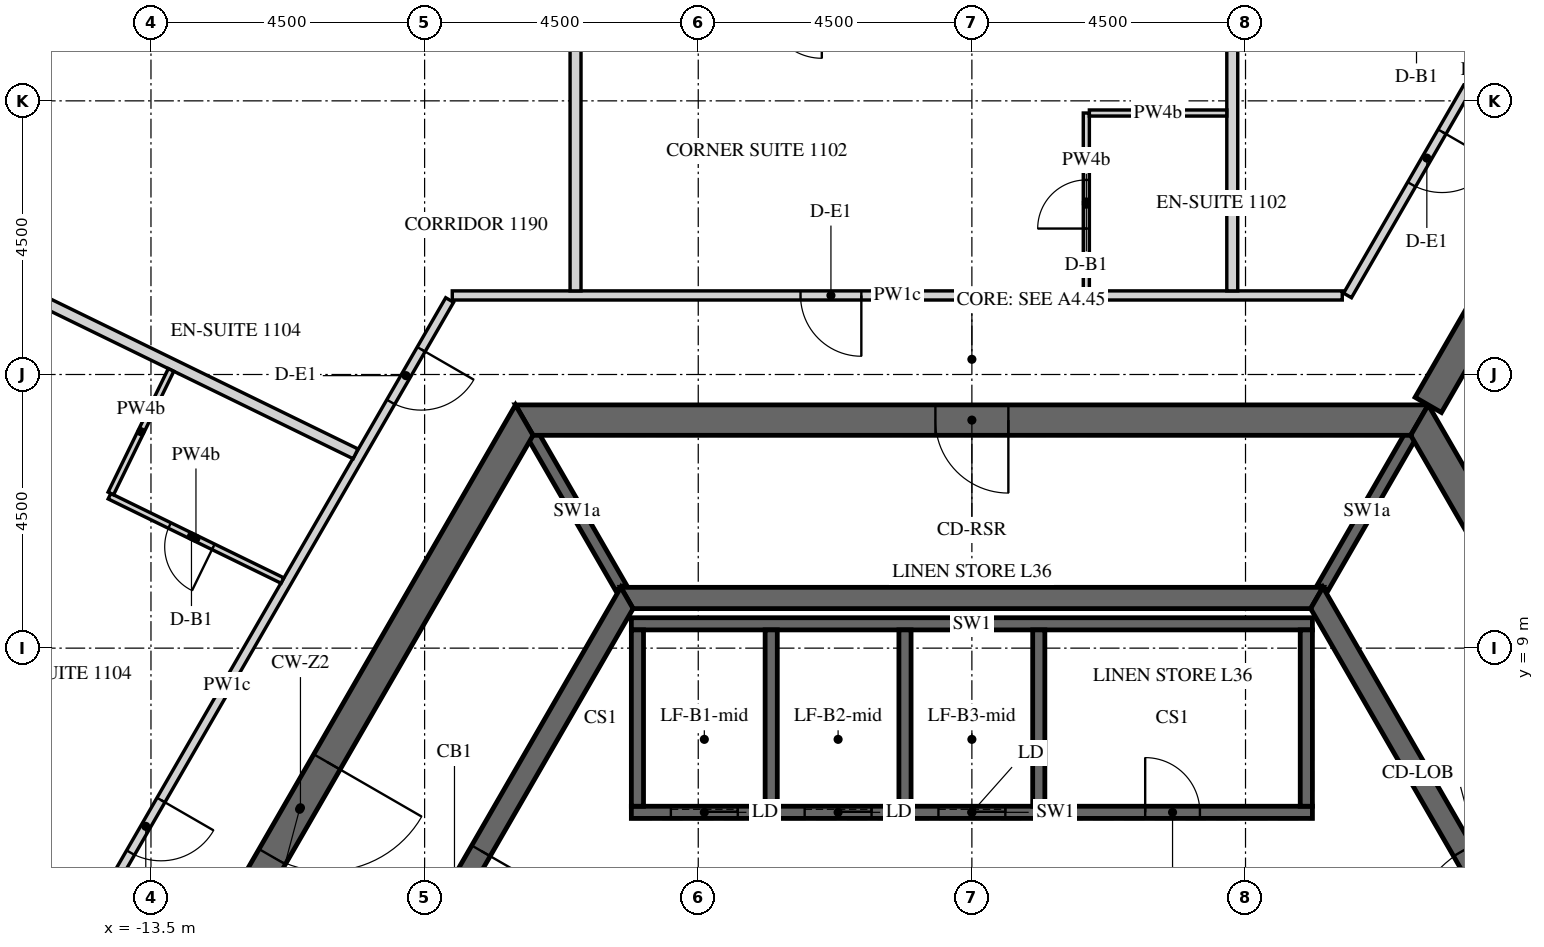
"""IFC4 building model, lengths in metres.
Left out: names, types, materials, properties, quantities, classifications, styles, units other than length and angle.
Written with IfcOpenShell. Run it as: python <this file> out.ifc"""

import sys

from ifc_helpers import new_model, si_unit, direction, frame, frame_2d, origin, place, context, subcontext, project, spatial, polyline, rectangle, outline, extrude, element, fill, save


model = new_model("IFC4")
c1 = context("Model", 3, precision=1e-05, world=origin(), true_north=direction((0.0, 1.0)))
c2 = subcontext(c1, "Body", "Model", "MODEL_VIEW")
j1 = project(units=[si_unit("LENGTHUNIT", "METRE"), si_unit("PLANEANGLEUNIT", "RADIAN")], contexts=[c1])
p1 = place(None, origin())
s1 = spatial("IfcSite", under=j1, at=p1, CompositionType="ELEMENT")
p2 = place(p1, origin())
s2 = spatial("IfcBuilding", under=s1, at=p2, CompositionType="ELEMENT")
p3 = place(p2, frame((0.0, 0.0, 156.6)))
s3 = spatial("IfcBuildingStorey", under=s2, at=p3, CompositionType="ELEMENT", Elevation=156.6)
p4 = place(p3, frame((-7.361, 12.75, -0.15), z_axis=(0.0, 0.0, 1.0), x_axis=(-0.50000571537, -0.866022103989, 0.0)))
e1 = element("IfcWall", 1, at=p4, inside=s3, PredefinedType="SHEAR", context=c2, shape_type="SweptSolid", body=[
    extrude(outline(polyline([(-0.144, -0.25), (14.867, -0.25), (14.578, 0.25), (0.144, 0.25), (-0.144, -0.25)])), origin(), (0.0, 0.0, 1.0), 3.9),
])
p5 = place(p4, frame((6.49, 0.0, 0.15)))
e2 = element("IfcOpeningElement", 2, at=p5, cuts=e1, PredefinedType="OPENING", context=c2, shape_type="SweptSolid", body=[
    extrude(rectangle(XDim=1.8, YDim=2.4, at=frame_2d((0.9, 1.2))), frame((0.0, 0.26, 0.0), z_axis=(0.0, -1.0, 0.0), x_axis=(1.0, 0.0, 0.0)), (0.0, 0.0, 1.0), 0.52),
])
p6 = place(p3, frame((14.722, 0.0, -0.15), z_axis=(0.0, 0.0, 1.0), x_axis=(-0.50000571537, 0.866022103989, 0.0)))
e3 = element("IfcWall", 3, at=p6, inside=s3, PredefinedType="SHEAR", context=c2, shape_type="SweptSolid", body=[
    extrude(outline(polyline([(-0.144, -0.25), (14.867, -0.25), (14.578, 0.25), (0.144, 0.25), (-0.144, -0.25)])), origin(), (0.0, 0.0, 1.0), 3.9),
])
p7 = place(p6, frame((6.432, 0.0, 0.15)))
e4 = element("IfcOpeningElement", 4, at=p7, cuts=e3, PredefinedType="OPENING", context=c2, shape_type="SweptSolid", body=[
    extrude(rectangle(XDim=1.8, YDim=2.4, at=frame_2d((0.9, 1.2))), frame((0.0, 0.26, 0.0), z_axis=(0.0, -1.0, 0.0), x_axis=(1.0, 0.0, 0.0)), (0.0, 0.0, 1.0), 0.52),
])
p8 = place(p3, frame((7.361, 12.75, -0.15), z_axis=(0.0, 0.0, 1.0), x_axis=(-1.0, 0.0, 0.0)))
e5 = element("IfcWall", 5, at=p8, inside=s3, PredefinedType="SHEAR", context=c2, shape_type="SweptSolid", body=[
    extrude(outline(polyline([(-0.144, -0.25), (14.866, -0.25), (14.578, 0.25), (0.144, 0.25), (-0.144, -0.25)])), origin(), (0.0, 0.0, 1.0), 3.9),
])
p9 = place(p8, frame((6.761, 0.0, 0.15)))
e6 = element("IfcOpeningElement", 6, at=p9, cuts=e5, PredefinedType="OPENING", context=c2, shape_type="SweptSolid", body=[
    extrude(rectangle(XDim=1.2, YDim=2.4, at=frame_2d((0.6, 1.2))), frame((0.0, 0.26, 0.0), z_axis=(0.0, -1.0, 0.0), x_axis=(1.0, 0.0, 0.0)), (0.0, 0.0, 1.0), 0.52),
])
p10 = place(p3, frame((7.506, 13.0, -0.15), z_axis=(0.0, 0.0, 1.0), x_axis=(0.499988271576, 0.866032175087, 0.0)))
e7 = element("IfcWall", 7, at=p10, inside=s3, PredefinedType="SHEAR", context=c2, shape_type="SweptSolid", body=[
    extrude(rectangle(XDim=15.424, YDim=0.5, at=frame_2d((7.712, 0.0))), origin(), (0.0, 0.0, 1.0), 3.9),
])
p11 = place(p10, frame((6.812, 0.0, 0.15)))
e8 = element("IfcOpeningElement", 8, at=p11, cuts=e7, PredefinedType="OPENING", context=c2, shape_type="SweptSolid", body=[
    extrude(rectangle(XDim=1.8, YDim=2.4, at=frame_2d((0.9, 1.2))), frame((0.0, 0.26, 0.0), z_axis=(0.0, -1.0, 0.0), x_axis=(1.0, 0.0, 0.0)), (0.0, 0.0, 1.0), 0.52),
])
p12 = place(p3, frame((-5.673, 9.825, -0.15), z_axis=(0.0, 0.0, 1.0), x_axis=(-0.499995046907, -0.866028263435, 0.0)))
e9 = element("IfcWall", 9, at=p12, inside=s3, PredefinedType="SHEAR", context=c2, shape_type="SweptSolid", body=[
    extrude(outline(polyline([(-0.101, -0.175), (11.446, -0.175), (11.244, 0.175), (0.101, 0.175), (-0.101, -0.175)])), origin(), (0.0, 0.0, 1.0), 3.9),
])
p13 = place(p12, frame((4.801, 0.0, 0.15)))
e10 = element("IfcOpeningElement", 10, at=p13, cuts=e9, PredefinedType="OPENING", context=c2, shape_type="SweptSolid", body=[
    extrude(rectangle(XDim=1.8, YDim=2.4, at=frame_2d((0.9, 1.2))), frame((0.0, 0.185, 0.0), z_axis=(0.0, -1.0, 0.0), x_axis=(1.0, 0.0, 0.0)), (0.0, 0.0, 1.0), 0.37),
])
p14 = place(p3, frame((11.345, 0.0, -0.15), z_axis=(0.0, 0.0, 1.0), x_axis=(-0.499995046907, 0.866028263435, 0.0)))
e11 = element("IfcWall", 11, at=p14, inside=s3, PredefinedType="SHEAR", context=c2, shape_type="SweptSolid", body=[
    extrude(outline(polyline([(-0.101, -0.175), (11.446, -0.175), (11.244, 0.175), (0.101, 0.175), (-0.101, -0.175)])), origin(), (0.0, 0.0, 1.0), 3.9),
])
p15 = place(p14, frame((4.744, 0.0, 0.15)))
e12 = element("IfcOpeningElement", 12, at=p15, cuts=e11, PredefinedType="OPENING", context=c2, shape_type="SweptSolid", body=[
    extrude(rectangle(XDim=1.8, YDim=2.4, at=frame_2d((0.9, 1.2))), frame((0.0, 0.185, 0.0), z_axis=(0.0, -1.0, 0.0), x_axis=(1.0, 0.0, 0.0)), (0.0, 0.0, 1.0), 0.37),
])
p16 = place(p3, frame((5.673, 9.825, -0.15), z_axis=(0.0, 0.0, 1.0), x_axis=(-1.0, 0.0, 0.0)))
e13 = element("IfcWall", 13, at=p16, inside=s3, PredefinedType="SHEAR", context=c2, shape_type="SweptSolid", body=[
    extrude(outline(polyline([(-0.101, -0.175), (11.446, -0.175), (11.244, 0.175), (0.101, 0.175), (-0.101, -0.175)])), origin(), (0.0, 0.0, 1.0), 3.9),
])
p17 = place(p3, frame((-5.6, 6.3, -0.25), z_axis=(0.0, 0.0, 1.0), x_axis=(1.0, 0.0, 0.0)))
e14 = element("IfcWall", 14, at=p17, inside=s3, PredefinedType="SHEAR", context=c2, shape_type="SweptSolid", body=[
    extrude(rectangle(XDim=11.2, YDim=0.2, at=frame_2d((5.6, 0.0))), origin(), (0.0, 0.0, 1.0), 3.9),
])
p18 = place(p17, frame((8.45, 0.0, 0.25)))
e15 = element("IfcOpeningElement", 15, at=p18, cuts=e14, PredefinedType="OPENING", context=c2, shape_type="SweptSolid", body=[
    extrude(rectangle(XDim=0.9, YDim=2.1, at=frame_2d((0.45, 1.05))), frame((0.0, 0.11, 0.0), z_axis=(0.0, -1.0, 0.0), x_axis=(1.0, 0.0, 0.0)), (0.0, 0.0, 1.0), 0.22),
])
p19 = place(p17, frame((0.65, 0.0, 0.25)))
e16 = element("IfcOpeningElement", 16, at=p19, cuts=e14, PredefinedType="OPENING", context=c2, shape_type="SweptSolid", body=[
    extrude(rectangle(XDim=1.1, YDim=2.1, at=frame_2d((0.55, 1.05))), frame((0.0, 0.11, 0.0), z_axis=(0.0, -1.0, 0.0), x_axis=(1.0, 0.0, 0.0)), (0.0, 0.0, 1.0), 0.22),
])
p20 = place(p17, frame((2.85, 0.0, 0.25)))
e17 = element("IfcOpeningElement", 17, at=p20, cuts=e14, PredefinedType="OPENING", context=c2, shape_type="SweptSolid", body=[
    extrude(rectangle(XDim=1.1, YDim=2.1, at=frame_2d((0.55, 1.05))), frame((0.0, 0.11, 0.0), z_axis=(0.0, -1.0, 0.0), x_axis=(1.0, 0.0, 0.0)), (0.0, 0.0, 1.0), 0.22),
])
p21 = place(p17, frame((5.05, 0.0, 0.25)))
e18 = element("IfcOpeningElement", 18, at=p21, cuts=e14, PredefinedType="OPENING", context=c2, shape_type="SweptSolid", body=[
    extrude(rectangle(XDim=1.1, YDim=2.1, at=frame_2d((0.55, 1.05))), frame((0.0, 0.11, 0.0), z_axis=(0.0, -1.0, 0.0), x_axis=(1.0, 0.0, 0.0)), (0.0, 0.0, 1.0), 0.22),
])
p22 = place(p3, frame((-5.6, 9.4, -0.25), z_axis=(0.0, 0.0, 1.0), x_axis=(1.0, 0.0, 0.0)))
e19 = element("IfcWall", 19, at=p22, inside=s3, PredefinedType="SHEAR", context=c2, shape_type="SweptSolid", body=[
    extrude(rectangle(XDim=11.2, YDim=0.2, at=frame_2d((5.6, 0.0))), origin(), (0.0, 0.0, 1.0), 3.9),
])
for number, where, z_axis, x_axis in (
    (20, (-5.5, 6.4, -0.25), (0.0, 0.0, 1.0), (0.0, 1.0, 0.0)),
    (21, (-3.3, 6.4, -0.25), (0.0, 0.0, 1.0), (0.0, 1.0, 0.0)),
    (22, (-1.1, 6.4, -0.25), (0.0, 0.0, 1.0), (0.0, 1.0, 0.0)),
    (23, (1.1, 6.4, -0.25), (0.0, 0.0, 1.0), (0.0, 1.0, 0.0)),
    (24, (5.5, 6.4, -0.25), (0.0, 0.0, 1.0), (0.0, 1.0, 0.0)),
):
    element("IfcWall", number, at=place(p3, frame(where, z_axis=z_axis, x_axis=x_axis)), inside=s3, PredefinedType="SHEAR", context=c2, shape_type="SweptSolid", body=[
        extrude(rectangle(XDim=2.9, YDim=0.2, at=frame_2d((1.45, 0.0))), origin(), (0.0, 0.0, 1.0), 3.9),
    ])
for number, where, z_axis, x_axis in (
    (25, (5.773, 10.0, -0.15), (0.0, 0.0, 1.0), (0.5, 0.866, 0.0)),
    (26, (-5.773, 10.0, -0.15), (0.0, 0.0, 1.0), (-0.5, 0.866, 0.0)),
):
    element("IfcWall", number, at=place(p3, frame(where, z_axis=z_axis, x_axis=x_axis)), inside=s3, PredefinedType="SHEAR", context=c2, shape_type="SweptSolid", body=[
        extrude(rectangle(XDim=2.887, YDim=0.2, at=frame_2d((1.443, 0.0))), origin(), (0.0, 0.0, 1.0), 3.9),
    ])
p23 = place(p3, frame((10.149, 21.678, 0.0), z_axis=(0.0, 0.0, 1.0), x_axis=(-0.499997422768, -0.866026891745, 0.0)))
e27 = element("IfcWall", 27, at=p23, inside=s3, PredefinedType="PARTITIONING", context=c2, shape_type="SweptSolid", body=[
    extrude(rectangle(XDim=7.942, YDim=0.15, at=frame_2d((3.971, 0.0))), origin(), (0.0, 0.0, 1.0), 2.823),
])
p24 = place(p23, frame((4.833, 0.0, 0.0)))
e28 = element("IfcOpeningElement", 28, at=p24, cuts=e27, PredefinedType="OPENING", context=c2, shape_type="SweptSolid", body=[
    extrude(rectangle(XDim=1.0, YDim=2.1, at=frame_2d((0.5, 1.05))), frame((0.0, 0.085, 0.0), z_axis=(0.0, -1.0, 0.0), x_axis=(1.0, 0.0, 0.0)), (0.0, 0.0, 1.0), 0.17),
])
p25 = place(p3, frame((6.091, 14.8, 0.0), z_axis=(0.0, 0.0, 1.0), x_axis=(-1.0, 0.0, 0.0)))
e29 = element("IfcWall", 29, at=p25, inside=s3, PredefinedType="PARTITIONING", context=c2, shape_type="SweptSolid", body=[
    extrude(rectangle(XDim=14.636, YDim=0.15, at=frame_2d((7.318, 0.0))), origin(), (0.0, 0.0, 1.0), 2.823),
])
p26 = place(p25, frame((7.909, 0.0, 0.0)))
e30 = element("IfcOpeningElement", 30, at=p26, cuts=e29, PredefinedType="OPENING", context=c2, shape_type="SweptSolid", body=[
    extrude(rectangle(XDim=1.0, YDim=2.1, at=frame_2d((0.5, 1.05))), frame((0.0, 0.085, 0.0), z_axis=(0.0, -1.0, 0.0), x_axis=(1.0, 0.0, 0.0)), (0.0, 0.0, 1.0), 0.17),
])
p27 = place(p3, frame((-8.588, 14.725, 0.0), z_axis=(0.0, 0.0, 1.0), x_axis=(-0.499996322767, -0.866027526826, 0.0)))
e31 = element("IfcWall", 31, at=p27, inside=s3, PredefinedType="PARTITIONING", context=c2, shape_type="SweptSolid", body=[
    extrude(rectangle(XDim=14.636, YDim=0.15, at=frame_2d((7.318, 0.0))), origin(), (0.0, 0.0, 1.0), 2.823),
])
p28 = place(p27, frame((0.936, 0.0, 0.0)))
e32 = element("IfcOpeningElement", 32, at=p28, cuts=e31, PredefinedType="OPENING", context=c2, shape_type="SweptSolid", body=[
    extrude(rectangle(XDim=1.0, YDim=2.1, at=frame_2d((0.5, 1.05))), frame((0.0, 0.085, 0.0), z_axis=(0.0, -1.0, 0.0), x_axis=(1.0, 0.0, 0.0)), (0.0, 0.0, 1.0), 0.17),
])
p29 = place(p27, frame((9.495, 0.0, 0.0)))
e33 = element("IfcOpeningElement", 33, at=p29, cuts=e31, PredefinedType="OPENING", context=c2, shape_type="SweptSolid", body=[
    extrude(rectangle(XDim=1.0, YDim=2.1, at=frame_2d((0.5, 1.05))), frame((0.0, 0.085, 0.0), z_axis=(0.0, -1.0, 0.0), x_axis=(1.0, 0.0, 0.0)), (0.0, 0.0, 1.0), 0.17),
])
p30 = place(p3, frame((4.282, 27.45, 0.0), z_axis=(0.0, 0.0, 1.0), x_axis=(0.0, -1.0, 0.0)))
e34 = element("IfcWall", 34, at=p30, inside=s3, PredefinedType="PARTITIONING", context=c2, shape_type="SweptSolid", body=[
    extrude(rectangle(XDim=12.575, YDim=0.18, at=frame_2d((6.288, 0.0))), origin(), (0.0, 0.0, 1.0), 2.823),
])
p31 = place(p3, frame((1.882, 14.875, 0.0), z_axis=(0.0, 0.0, 1.0), x_axis=(0.0, 1.0, 0.0)))
e35 = element("IfcWall", 35, at=p31, inside=s3, PredefinedType="PARTITIONING", context=c2, shape_type="SweptSolid", body=[
    extrude(rectangle(XDim=2.925, YDim=0.1, at=frame_2d((1.462, 0.0))), origin(), (0.0, 0.0, 1.0), 2.823),
])
p32 = place(p31, frame((1.025, 0.0, 0.0)))
e36 = element("IfcOpeningElement", 36, at=p32, cuts=e35, PredefinedType="OPENING", context=c2, shape_type="SweptSolid", body=[
    extrude(rectangle(XDim=0.8, YDim=2.1, at=frame_2d((0.4, 1.05))), frame((0.0, 0.06, 0.0), z_axis=(0.0, -1.0, 0.0), x_axis=(1.0, 0.0, 0.0)), (0.0, 0.0, 1.0), 0.12),
])
p33 = place(p3, frame((1.932, 17.8, 0.0), z_axis=(0.0, 0.0, 1.0), x_axis=(1.0, 0.0, 0.0)))
e37 = element("IfcWall", 37, at=p33, inside=s3, PredefinedType="PARTITIONING", context=c2, shape_type="SweptSolid", body=[
    extrude(rectangle(XDim=2.26, YDim=0.1, at=frame_2d((1.13, 0.0))), origin(), (0.0, 0.0, 1.0), 2.823),
])
p34 = place(p3, frame((-6.518, 27.45, 0.0), z_axis=(0.0, 0.0, 1.0), x_axis=(0.0, -1.0, 0.0)))
e38 = element("IfcWall", 38, at=p34, inside=s3, PredefinedType="PARTITIONING", context=c2, shape_type="SweptSolid", body=[
    extrude(rectangle(XDim=12.575, YDim=0.18, at=frame_2d((6.288, 0.0))), origin(), (0.0, 0.0, 1.0), 2.823),
])
p35 = place(p3, frame((-21.815, 17.892, 0.0), z_axis=(0.0, 0.0, 1.0), x_axis=(0.898798778742, -0.43836144371, 0.0)))
e39 = element("IfcWall", 39, at=p35, inside=s3, PredefinedType="PARTITIONING", context=c2, shape_type="SweptSolid", body=[
    extrude(rectangle(XDim=12.994, YDim=0.18, at=frame_2d((6.497, 0.0))), origin(), (0.0, 0.0, 1.0), 2.823),
])
p36 = place(p3, frame((-11.338, 10.112, 0.0), z_axis=(0.0, 0.0, 1.0), x_axis=(-0.898781792608, 0.438396269688, 0.0)))
e40 = element("IfcWall", 40, at=p36, inside=s3, PredefinedType="PARTITIONING", context=c2, shape_type="SweptSolid", body=[
    extrude(rectangle(XDim=3.164, YDim=0.1, at=frame_2d((1.582, 0.0))), origin(), (0.0, 0.0, 1.0), 2.823),
])
p37 = place(p36, frame((1.264, 0.0, 0.0)))
e41 = element("IfcOpeningElement", 41, at=p37, cuts=e40, PredefinedType="OPENING", context=c2, shape_type="SweptSolid", body=[
    extrude(rectangle(XDim=0.8, YDim=2.1, at=frame_2d((0.4, 1.05))), frame((0.0, 0.06, 0.0), z_axis=(0.0, -1.0, 0.0), x_axis=(1.0, 0.0, 0.0)), (0.0, 0.0, 1.0), 0.12),
])
p38 = place(p3, frame((-14.16, 11.544, 0.0), z_axis=(0.0, 0.0, 1.0), x_axis=(0.438376807268, 0.898791285477, 0.0)))
e42 = element("IfcWall", 42, at=p38, inside=s3, PredefinedType="PARTITIONING", context=c2, shape_type="SweptSolid", body=[
    extrude(rectangle(XDim=2.26, YDim=0.1, at=frame_2d((1.13, 0.0))), origin(), (0.0, 0.0, 1.0), 2.823),
])
p39 = place(p5, origin())
e43 = element("IfcDoor", 43, at=p39, inside=s3, OperationType="DOUBLE_DOOR_SINGLE_SWING", PredefinedType="DOOR", context=c2, shape_type="SweptSolid", body=[
    extrude(rectangle(XDim=1.8, YDim=2.4, at=frame_2d((0.9, 1.2))), frame((0.0, 0.025, 0.0), z_axis=(0.0, -1.0, 0.0), x_axis=(1.0, 0.0, 0.0)), (0.0, 0.0, 1.0), 0.05),
])
fill(e2, e43)
p40 = place(p9, origin())
e44 = element("IfcDoor", 44, at=p40, inside=s3, OperationType="SINGLE_SWING_LEFT", PredefinedType="DOOR", context=c2, shape_type="SweptSolid", body=[
    extrude(rectangle(XDim=1.2, YDim=2.4, at=frame_2d((0.6, 1.2))), frame((0.0, 0.025, 0.0), z_axis=(0.0, -1.0, 0.0), x_axis=(1.0, 0.0, 0.0)), (0.0, 0.0, 1.0), 0.05),
])
fill(e6, e44)
p41 = place(p13, origin())
e45 = element("IfcDoor", 45, at=p41, inside=s3, OperationType="DOUBLE_DOOR_SINGLE_SWING", PredefinedType="DOOR", context=c2, shape_type="SweptSolid", body=[
    extrude(rectangle(XDim=1.8, YDim=2.4, at=frame_2d((0.9, 1.2))), frame((0.0, 0.025, 0.0), z_axis=(0.0, -1.0, 0.0), x_axis=(1.0, 0.0, 0.0)), (0.0, 0.0, 1.0), 0.05),
])
fill(e10, e45)
p42 = place(p15, origin())
e46 = element("IfcDoor", 46, at=p42, inside=s3, OperationType="DOUBLE_DOOR_SINGLE_SWING", PredefinedType="DOOR", context=c2, shape_type="SweptSolid", body=[
    extrude(rectangle(XDim=1.8, YDim=2.4, at=frame_2d((0.9, 1.2))), frame((0.0, 0.025, 0.0), z_axis=(0.0, -1.0, 0.0), x_axis=(1.0, 0.0, 0.0)), (0.0, 0.0, 1.0), 0.05),
])
fill(e12, e46)
p43 = place(p18, origin())
e47 = element("IfcDoor", 47, at=p43, inside=s3, OperationType="SINGLE_SWING_LEFT", PredefinedType="DOOR", context=c2, shape_type="SweptSolid", body=[
    extrude(rectangle(XDim=0.9, YDim=2.1, at=frame_2d((0.45, 1.05))), frame((0.0, 0.025, 0.0), z_axis=(0.0, -1.0, 0.0), x_axis=(1.0, 0.0, 0.0)), (0.0, 0.0, 1.0), 0.05),
])
fill(e15, e47)
p44 = place(p19, origin())
e48 = element("IfcDoor", 48, at=p44, inside=s3, OperationType="SLIDING_TO_LEFT", PredefinedType="DOOR", context=c2, shape_type="SweptSolid", body=[
    extrude(rectangle(XDim=1.1, YDim=2.1, at=frame_2d((0.55, 1.05))), frame((0.0, 0.025, 0.0), z_axis=(0.0, -1.0, 0.0), x_axis=(1.0, 0.0, 0.0)), (0.0, 0.0, 1.0), 0.05),
])
fill(e16, e48)
p45 = place(p20, origin())
e49 = element("IfcDoor", 49, at=p45, inside=s3, OperationType="SLIDING_TO_LEFT", PredefinedType="DOOR", context=c2, shape_type="SweptSolid", body=[
    extrude(rectangle(XDim=1.1, YDim=2.1, at=frame_2d((0.55, 1.05))), frame((0.0, 0.025, 0.0), z_axis=(0.0, -1.0, 0.0), x_axis=(1.0, 0.0, 0.0)), (0.0, 0.0, 1.0), 0.05),
])
fill(e17, e49)
p46 = place(p21, origin())
e50 = element("IfcDoor", 50, at=p46, inside=s3, OperationType="SLIDING_TO_LEFT", PredefinedType="DOOR", context=c2, shape_type="SweptSolid", body=[
    extrude(rectangle(XDim=1.1, YDim=2.1, at=frame_2d((0.55, 1.05))), frame((0.0, 0.025, 0.0), z_axis=(0.0, -1.0, 0.0), x_axis=(1.0, 0.0, 0.0)), (0.0, 0.0, 1.0), 0.05),
])
fill(e18, e50)
p47 = place(p24, origin())
e51 = element("IfcDoor", 51, at=p47, inside=s3, OperationType="SINGLE_SWING_LEFT", PredefinedType="DOOR", context=c2, shape_type="SweptSolid", body=[
    extrude(rectangle(XDim=1.0, YDim=2.1, at=frame_2d((0.5, 1.05))), frame((0.0, 0.025, 0.0), z_axis=(0.0, -1.0, 0.0), x_axis=(1.0, 0.0, 0.0)), (0.0, 0.0, 1.0), 0.05),
])
fill(e28, e51)
p48 = place(p26, origin())
e52 = element("IfcDoor", 52, at=p48, inside=s3, OperationType="SINGLE_SWING_RIGHT", PredefinedType="DOOR", context=c2, shape_type="SweptSolid", body=[
    extrude(rectangle(XDim=1.0, YDim=2.1, at=frame_2d((0.5, 1.05))), frame((0.0, 0.025, 0.0), z_axis=(0.0, -1.0, 0.0), x_axis=(1.0, 0.0, 0.0)), (0.0, 0.0, 1.0), 0.05),
])
fill(e30, e52)
p49 = place(p32, origin())
e53 = element("IfcDoor", 53, at=p49, inside=s3, OperationType="SINGLE_SWING_RIGHT", PredefinedType="DOOR", context=c2, shape_type="SweptSolid", body=[
    extrude(rectangle(XDim=0.8, YDim=2.1, at=frame_2d((0.4, 1.05))), frame((0.0, 0.025, 0.0), z_axis=(0.0, -1.0, 0.0), x_axis=(1.0, 0.0, 0.0)), (0.0, 0.0, 1.0), 0.05),
])
fill(e36, e53)
p50 = place(p28, origin())
e54 = element("IfcDoor", 54, at=p50, inside=s3, OperationType="SINGLE_SWING_RIGHT", PredefinedType="DOOR", context=c2, shape_type="SweptSolid", body=[
    extrude(rectangle(XDim=1.0, YDim=2.1, at=frame_2d((0.5, 1.05))), frame((0.0, 0.025, 0.0), z_axis=(0.0, -1.0, 0.0), x_axis=(1.0, 0.0, 0.0)), (0.0, 0.0, 1.0), 0.05),
])
fill(e32, e54)
p51 = place(p29, origin())
e55 = element("IfcDoor", 55, at=p51, inside=s3, OperationType="SINGLE_SWING_RIGHT", PredefinedType="DOOR", context=c2, shape_type="SweptSolid", body=[
    extrude(rectangle(XDim=1.0, YDim=2.1, at=frame_2d((0.5, 1.05))), frame((0.0, 0.025, 0.0), z_axis=(0.0, -1.0, 0.0), x_axis=(1.0, 0.0, 0.0)), (0.0, 0.0, 1.0), 0.05),
])
fill(e33, e55)
p52 = place(p37, origin())
e56 = element("IfcDoor", 56, at=p52, inside=s3, OperationType="SINGLE_SWING_LEFT", PredefinedType="DOOR", context=c2, shape_type="SweptSolid", body=[
    extrude(rectangle(XDim=0.8, YDim=2.1, at=frame_2d((0.4, 1.05))), frame((0.0, 0.025, 0.0), z_axis=(0.0, -1.0, 0.0), x_axis=(1.0, 0.0, 0.0)), (0.0, 0.0, 1.0), 0.05),
])
fill(e41, e56)
save(model, sys.argv[1])
